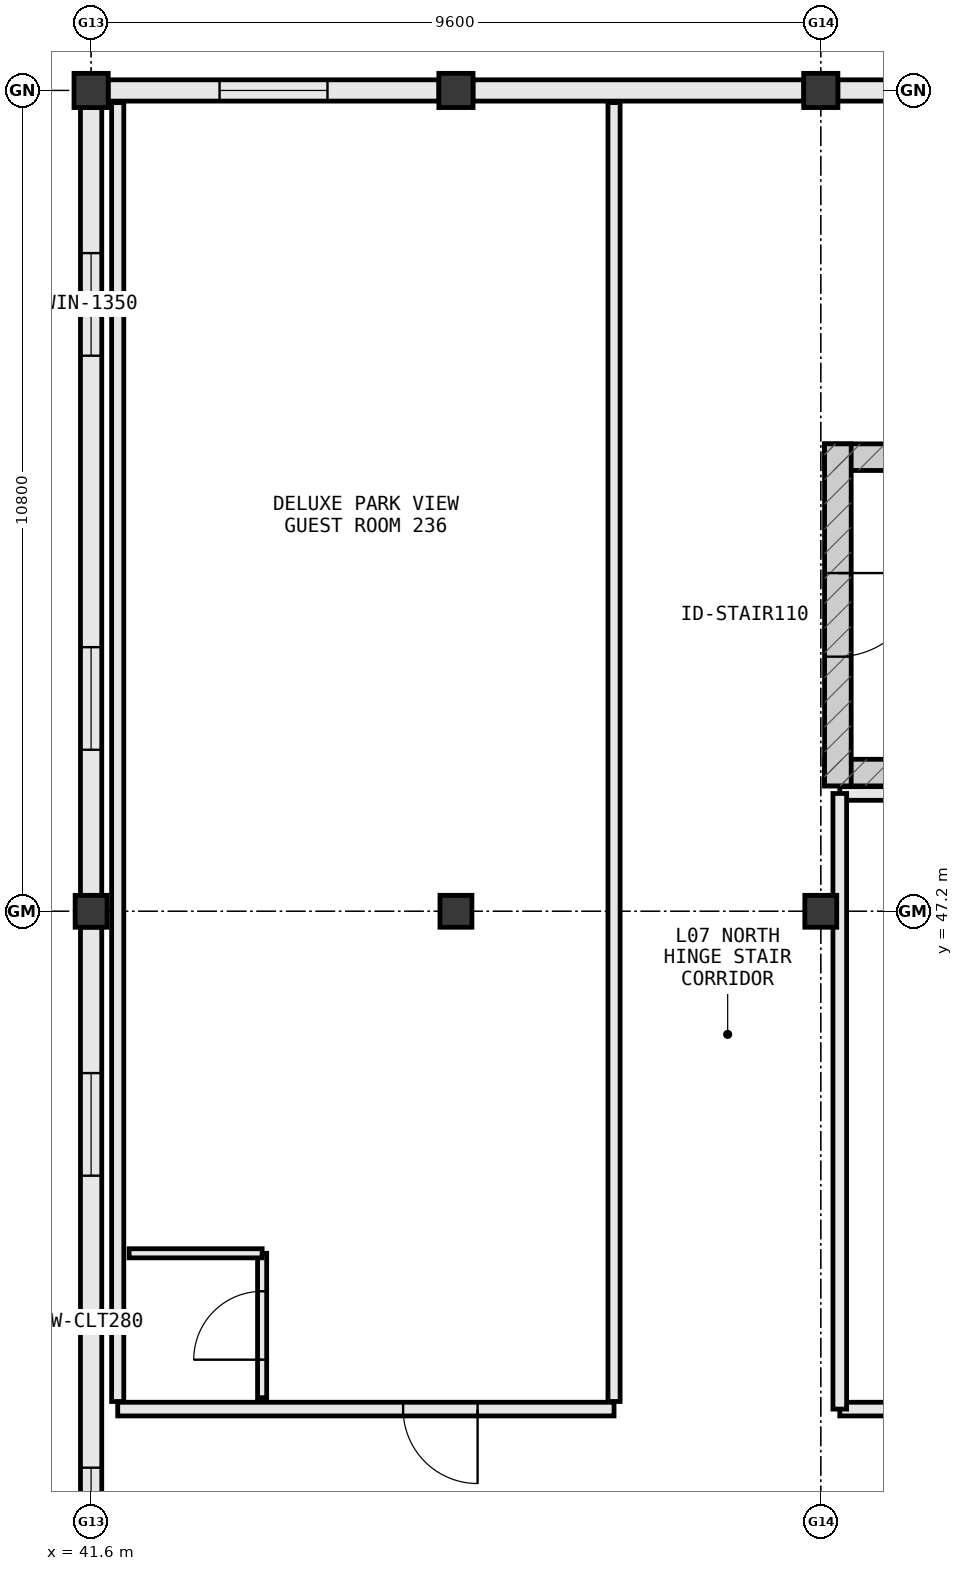
"""IFC4 building model, lengths in metres.
Left out: names, types, materials, properties, quantities, classifications, styles, units other than length and angle.
Written with IfcOpenShell. Run it as: python <this file> out.ifc"""

import sys

from ifc_helpers import new_model, si_unit, direction, frame, frame_2d, origin, origin_2d, place, context, subcontext, project, spatial, rectangle, extrude, element, fill, save


model = new_model("IFC4")
c1 = context("Model", 3, precision=1e-05, world=origin(), true_north=direction((0.0, 1.0)))
c2 = subcontext(c1, "Body", "Model", "MODEL_VIEW")
j1 = project(units=[si_unit("LENGTHUNIT", "METRE"), si_unit("PLANEANGLEUNIT", "RADIAN")], contexts=[c1])
p1 = place(None, origin())
s1 = spatial("IfcSite", under=j1, at=p1, CompositionType="ELEMENT")
p2 = place(p1, origin())
s2 = spatial("IfcBuilding", under=s1, at=p2, CompositionType="ELEMENT")
p3 = place(p2, frame((0.0, 0.0, 31.4)))
s3 = spatial("IfcBuildingStorey", under=s2, at=p3, CompositionType="ELEMENT", Elevation=31.4)
p4 = place(p3, frame((41.6, 58.0, 0.0), z_axis=(0.0, 0.0, 1.0), x_axis=(1.0, 0.0, 0.0)))
e1 = element("IfcColumn", 1, at=p4, inside=s3, PredefinedType="COLUMN", context=c2, shape_type="SweptSolid", body=[
    extrude(rectangle(XDim=0.45, YDim=0.45, at=origin_2d()), origin(), (0.0, 0.0, 1.0), 3.8),
])
for number, where, z_axis, x_axis in (
    (2, (41.6, 47.2, 0.0), (0.0, 0.0, 1.0), (1.0, 0.0, 0.0)),
    (3, (46.4, 47.2, 0.0), (0.0, 0.0, 1.0), (1.0, 0.0, 0.0)),
):
    element("IfcColumn", number, at=place(p3, frame(where, z_axis=z_axis, x_axis=x_axis)), inside=s3, PredefinedType="COLUMN", context=c2, shape_type="SweptSolid", body=[
        extrude(rectangle(XDim=0.42, YDim=0.42, at=origin_2d()), origin(), (0.0, 0.0, 1.0), 3.8),
    ])
p5 = place(p3, frame((46.4, 58.0, 0.0), z_axis=(0.0, 0.0, 1.0), x_axis=(1.0, 0.0, 0.0)))
e4 = element("IfcColumn", 4, at=p5, inside=s3, PredefinedType="COLUMN", context=c2, shape_type="SweptSolid", body=[
    extrude(rectangle(XDim=0.45, YDim=0.45, at=origin_2d()), origin(), (0.0, 0.0, 1.0), 3.8),
])
p6 = place(p3, frame((51.2, 47.2, 0.0), z_axis=(0.0, 0.0, 1.0), x_axis=(1.0, 0.0, 0.0)))
e5 = element("IfcColumn", 5, at=p6, inside=s3, PredefinedType="COLUMN", context=c2, shape_type="SweptSolid", body=[
    extrude(rectangle(XDim=0.42, YDim=0.42, at=origin_2d()), origin(), (0.0, 0.0, 1.0), 3.8),
])
p7 = place(p3, frame((51.2, 58.0, 0.0), z_axis=(0.0, 0.0, 1.0), x_axis=(1.0, 0.0, 0.0)))
e6 = element("IfcColumn", 6, at=p7, inside=s3, PredefinedType="COLUMN", context=c2, shape_type="SweptSolid", body=[
    extrude(rectangle(XDim=0.45, YDim=0.45, at=origin_2d()), origin(), (0.0, 0.0, 1.0), 3.8),
])
p8 = place(p3, frame((60.577, 58.0, 0.0), z_axis=(0.0, 0.0, 1.0), x_axis=(-1.0, 0.0, 0.0)))
e7 = element("IfcWall", 7, at=p8, inside=s3, PredefinedType="STANDARD", context=c2, shape_type="SweptSolid", body=[
    extrude(rectangle(XDim=9.154, YDim=0.28, at=frame_2d((4.577, 0.0))), origin(), (0.0, 0.0, 1.0), 2.87),
])
p9 = place(p8, frame((1.579, 0.0, 0.85)))
e8 = element("IfcOpeningElement", 8, at=p9, cuts=e7, PredefinedType="OPENING", context=c2, shape_type="SweptSolid", body=[
    extrude(rectangle(XDim=1.42, YDim=1.7, at=frame_2d((0.71, 0.85))), frame((0.0, 0.152, 0.0), z_axis=(0.0, -1.0, 0.0), x_axis=(1.0, 0.0, 0.0)), (0.0, 0.0, 1.0), 0.304),
])
p10 = place(p8, frame((6.156, 0.0, 0.85)))
e9 = element("IfcOpeningElement", 9, at=p10, cuts=e7, PredefinedType="OPENING", context=c2, shape_type="SweptSolid", body=[
    extrude(rectangle(XDim=1.42, YDim=1.7, at=frame_2d((0.71, 0.85))), frame((0.0, 0.152, 0.0), z_axis=(0.0, -1.0, 0.0), x_axis=(1.0, 0.0, 0.0)), (0.0, 0.0, 1.0), 0.304),
])
p11 = place(p3, frame((50.977, 58.0, 0.0), z_axis=(0.0, 0.0, 1.0), x_axis=(-1.0, 0.0, 0.0)))
e10 = element("IfcWall", 10, at=p11, inside=s3, PredefinedType="STANDARD", context=c2, shape_type="SweptSolid", body=[
    extrude(rectangle(XDim=4.354, YDim=0.28, at=frame_2d((2.177, 0.0))), origin(), (0.0, 0.0, 1.0), 2.87),
])
p12 = place(p3, frame((46.177, 58.0, 0.0), z_axis=(0.0, 0.0, 1.0), x_axis=(-1.0, 0.0, 0.0)))
e11 = element("IfcWall", 11, at=p12, inside=s3, PredefinedType="STANDARD", context=c2, shape_type="SweptSolid", body=[
    extrude(rectangle(XDim=4.354, YDim=0.28, at=frame_2d((2.177, 0.0))), origin(), (0.0, 0.0, 1.0), 2.87),
])
p13 = place(p12, frame((1.467, 0.0, 0.85)))
e12 = element("IfcOpeningElement", 12, at=p13, cuts=e11, PredefinedType="OPENING", context=c2, shape_type="SweptSolid", body=[
    extrude(rectangle(XDim=1.42, YDim=1.7, at=frame_2d((0.71, 0.85))), frame((0.0, 0.152, 0.0), z_axis=(0.0, -1.0, 0.0), x_axis=(1.0, 0.0, 0.0)), (0.0, 0.0, 1.0), 0.304),
])
p14 = place(p3, frame((41.6, 57.777, 0.0), z_axis=(0.0, 0.0, 1.0), x_axis=(0.0, -1.0, 0.0)))
e13 = element("IfcWall", 13, at=p14, inside=s3, PredefinedType="STANDARD", context=c2, shape_type="SweptSolid", body=[
    extrude(rectangle(XDim=10.369, YDim=0.28, at=frame_2d((5.185, 0.0))), origin(), (0.0, 0.0, 1.0), 2.91),
])
p15 = place(p14, frame((1.917, 0.0, 0.85)))
e14 = element("IfcOpeningElement", 14, at=p15, cuts=e13, PredefinedType="OPENING", context=c2, shape_type="SweptSolid", body=[
    extrude(rectangle(XDim=1.35, YDim=1.65, at=frame_2d((0.675, 0.825))), frame((0.0, 0.152, 0.0), z_axis=(0.0, -1.0, 0.0), x_axis=(1.0, 0.0, 0.0)), (0.0, 0.0, 1.0), 0.304),
])
p16 = place(p14, frame((7.102, 0.0, 0.85)))
e15 = element("IfcOpeningElement", 15, at=p16, cuts=e13, PredefinedType="OPENING", context=c2, shape_type="SweptSolid", body=[
    extrude(rectangle(XDim=1.35, YDim=1.65, at=frame_2d((0.675, 0.825))), frame((0.0, 0.152, 0.0), z_axis=(0.0, -1.0, 0.0), x_axis=(1.0, 0.0, 0.0)), (0.0, 0.0, 1.0), 0.304),
])
p17 = place(p3, frame((41.6, 46.992, 0.0), z_axis=(0.0, 0.0, 1.0), x_axis=(0.0, -1.0, 0.0)))
e16 = element("IfcWall", 16, at=p17, inside=s3, PredefinedType="STANDARD", context=c2, shape_type="SweptSolid", body=[
    extrude(rectangle(XDim=10.384, YDim=0.28, at=frame_2d((5.192, 0.0))), origin(), (0.0, 0.0, 1.0), 2.91),
])
p18 = place(p17, frame((1.921, 0.0, 0.85)))
e17 = element("IfcOpeningElement", 17, at=p18, cuts=e16, PredefinedType="OPENING", context=c2, shape_type="SweptSolid", body=[
    extrude(rectangle(XDim=1.35, YDim=1.65, at=frame_2d((0.675, 0.825))), frame((0.0, 0.152, 0.0), z_axis=(0.0, -1.0, 0.0), x_axis=(1.0, 0.0, 0.0)), (0.0, 0.0, 1.0), 0.304),
])
p19 = place(p17, frame((7.113, 0.0, 0.85)))
e18 = element("IfcOpeningElement", 18, at=p19, cuts=e16, PredefinedType="OPENING", context=c2, shape_type="SweptSolid", body=[
    extrude(rectangle(XDim=1.35, YDim=1.65, at=frame_2d((0.675, 0.825))), frame((0.0, 0.152, 0.0), z_axis=(0.0, -1.0, 0.0), x_axis=(1.0, 0.0, 0.0)), (0.0, 0.0, 1.0), 0.304),
])
for number, where, z_axis, x_axis in (
    (19, (51.25, 49.025, 0.0), (0.0, 0.0, 1.0), (1.0, 0.0, 0.0)),
    (20, (63.35, 53.175, 0.0), (0.0, 0.0, 1.0), (-1.0, 0.0, 0.0)),
):
    element("IfcWall", number, at=place(p3, frame(where, z_axis=z_axis, x_axis=x_axis)), inside=s3, PredefinedType="SHEAR", context=c2, shape_type="SweptSolid", body=[
        extrude(rectangle(XDim=12.1, YDim=0.35, at=frame_2d((6.05, 0.0))), origin(), (0.0, 0.0, 1.0), 3.8),
    ])
p20 = place(p3, frame((51.425, 53.35, 0.0), z_axis=(0.0, 0.0, 1.0), x_axis=(0.0, -1.0, 0.0)))
e21 = element("IfcWall", 21, at=p20, inside=s3, PredefinedType="SHEAR", context=c2, shape_type="SweptSolid", body=[
    extrude(rectangle(XDim=4.5, YDim=0.35, at=frame_2d((2.25, 0.0))), origin(), (0.0, 0.0, 1.0), 3.8),
])
p21 = place(p20, frame((1.7, 0.0, 0.0)))
e22 = element("IfcOpeningElement", 22, at=p21, cuts=e21, PredefinedType="OPENING", context=c2, shape_type="SweptSolid", body=[
    extrude(rectangle(XDim=1.1, YDim=2.2, at=frame_2d((0.55, 1.1))), frame((0.0, 0.187, 0.0), z_axis=(0.0, -1.0, 0.0), x_axis=(1.0, 0.0, 0.0)), (0.0, 0.0, 1.0), 0.374),
])
p22 = place(p3, frame((51.45, 40.65, 0.0), z_axis=(0.0, 0.0, 1.0), x_axis=(1.0, 0.0, 0.0)))
e23 = element("IfcWall", 23, at=p22, inside=s3, PredefinedType="PARTITIONING", context=c2, shape_type="SweptSolid", body=[
    extrude(rectangle(XDim=11.75, YDim=0.18, at=frame_2d((5.875, 0.0))), origin(), (0.0, 0.0, 1.0), 3.555),
])
p23 = place(p22, frame((5.35, 0.0, 0.0)))
e24 = element("IfcOpeningElement", 24, at=p23, cuts=e23, PredefinedType="OPENING", context=c2, shape_type="SweptSolid", body=[
    extrude(rectangle(XDim=1.05, YDim=2.2, at=frame_2d((0.525, 1.1))), frame((0.0, 0.102, 0.0), z_axis=(0.0, -1.0, 0.0), x_axis=(1.0, 0.0, 0.0)), (0.0, 0.0, 1.0), 0.204),
])
p24 = place(p3, frame((63.2, 48.75, 0.0), z_axis=(0.0, 0.0, 1.0), x_axis=(-1.0, 0.0, 0.0)))
e25 = element("IfcWall", 25, at=p24, inside=s3, PredefinedType="PARTITIONING", context=c2, shape_type="SweptSolid", body=[
    extrude(rectangle(XDim=11.75, YDim=0.18, at=frame_2d((5.875, 0.0))), origin(), (0.0, 0.0, 1.0), 3.555),
])
p25 = place(p3, frame((51.45, 48.75, 0.0), z_axis=(0.0, 0.0, 1.0), x_axis=(0.0, -1.0, 0.0)))
e26 = element("IfcWall", 26, at=p25, inside=s3, PredefinedType="PARTITIONING", context=c2, shape_type="SweptSolid", body=[
    extrude(rectangle(XDim=8.1, YDim=0.18, at=frame_2d((4.05, 0.0))), origin(), (0.0, 0.0, 1.0), 2.91),
])
p26 = place(p3, frame((41.95, 40.65, 0.0), z_axis=(0.0, 0.0, 1.0), x_axis=(1.0, 0.0, 0.0)))
e27 = element("IfcWall", 27, at=p26, inside=s3, PredefinedType="PARTITIONING", context=c2, shape_type="SweptSolid", body=[
    extrude(rectangle(XDim=6.53, YDim=0.18, at=frame_2d((3.265, 0.0))), origin(), (0.0, 0.0, 1.0), 3.555),
])
p27 = place(p26, frame((3.755, 0.0, 0.0)))
e28 = element("IfcOpeningElement", 28, at=p27, cuts=e27, PredefinedType="OPENING", context=c2, shape_type="SweptSolid", body=[
    extrude(rectangle(XDim=0.98, YDim=2.18, at=frame_2d((0.49, 1.09))), frame((0.0, 0.102, 0.0), z_axis=(0.0, -1.0, 0.0), x_axis=(1.0, 0.0, 0.0)), (0.0, 0.0, 1.0), 0.204),
])
p28 = place(p3, frame((41.95, 40.75, 0.0), z_axis=(0.0, 0.0, 1.0), x_axis=(0.0, 1.0, 0.0)))
e29 = element("IfcWall", 29, at=p28, inside=s3, PredefinedType="PARTITIONING", context=c2, shape_type="SweptSolid", body=[
    extrude(rectangle(XDim=17.09, YDim=0.16, at=frame_2d((8.545, 0.0))), origin(), (0.0, 0.0, 1.0), 2.91),
])
p29 = place(p3, frame((48.48, 40.75, 0.0), z_axis=(0.0, 0.0, 1.0), x_axis=(0.0, 1.0, 0.0)))
e30 = element("IfcWall", 30, at=p29, inside=s3, PredefinedType="PARTITIONING", context=c2, shape_type="SweptSolid", body=[
    extrude(rectangle(XDim=17.09, YDim=0.16, at=frame_2d((8.545, 0.0))), origin(), (0.0, 0.0, 1.0), 3.1),
])
p30 = place(p3, frame((43.85, 40.8, 0.0), z_axis=(0.0, 0.0, 1.0), x_axis=(0.0, 1.0, 0.0)))
e31 = element("IfcWall", 31, at=p30, inside=s3, PredefinedType="PARTITIONING", context=c2, shape_type="SweptSolid", body=[
    extrude(rectangle(XDim=1.9, YDim=0.12, at=frame_2d((0.95, 0.0))), origin(), (0.0, 0.0, 1.0), 3.1),
])
p31 = place(p30, frame((0.5, 0.0, 0.0)))
e32 = element("IfcOpeningElement", 32, at=p31, cuts=e31, PredefinedType="OPENING", context=c2, shape_type="SweptSolid", body=[
    extrude(rectangle(XDim=0.9, YDim=2.15, at=frame_2d((0.45, 1.075))), frame((0.0, 0.072, 0.0), z_axis=(0.0, -1.0, 0.0), x_axis=(1.0, 0.0, 0.0)), (0.0, 0.0, 1.0), 0.144),
])
p32 = place(p3, frame((42.1, 42.7, 0.0), z_axis=(0.0, 0.0, 1.0), x_axis=(1.0, 0.0, 0.0)))
e33 = element("IfcWall", 33, at=p32, inside=s3, PredefinedType="PARTITIONING", context=c2, shape_type="SweptSolid", body=[
    extrude(rectangle(XDim=1.75, YDim=0.12, at=frame_2d((0.875, 0.0))), origin(), (0.0, 0.0, 1.0), 3.555),
])
p33 = place(p13, origin())
e34 = element("IfcWindow", 34, at=p33, inside=s3, PartitioningType="SINGLE_PANEL", PredefinedType="WINDOW", context=c2, shape_type="SweptSolid", body=[
    extrude(rectangle(XDim=1.42, YDim=1.7, at=frame_2d((0.71, 0.85))), frame((0.0, 0.03, 0.0), z_axis=(0.0, -1.0, 0.0), x_axis=(1.0, 0.0, 0.0)), (0.0, 0.0, 1.0), 0.06),
])
fill(e12, e34)
p34 = place(p15, origin())
e35 = element("IfcWindow", 35, at=p34, inside=s3, PartitioningType="SINGLE_PANEL", PredefinedType="WINDOW", context=c2, shape_type="SweptSolid", body=[
    extrude(rectangle(XDim=1.35, YDim=1.65, at=frame_2d((0.675, 0.825))), frame((0.0, 0.03, 0.0), z_axis=(0.0, -1.0, 0.0), x_axis=(1.0, 0.0, 0.0)), (0.0, 0.0, 1.0), 0.06),
])
fill(e14, e35)
p35 = place(p16, origin())
e36 = element("IfcWindow", 36, at=p35, inside=s3, PartitioningType="SINGLE_PANEL", PredefinedType="WINDOW", context=c2, shape_type="SweptSolid", body=[
    extrude(rectangle(XDim=1.35, YDim=1.65, at=frame_2d((0.675, 0.825))), frame((0.0, 0.03, 0.0), z_axis=(0.0, -1.0, 0.0), x_axis=(1.0, 0.0, 0.0)), (0.0, 0.0, 1.0), 0.06),
])
fill(e15, e36)
p36 = place(p18, origin())
e37 = element("IfcWindow", 37, at=p36, inside=s3, PartitioningType="SINGLE_PANEL", PredefinedType="WINDOW", context=c2, shape_type="SweptSolid", body=[
    extrude(rectangle(XDim=1.35, YDim=1.65, at=frame_2d((0.675, 0.825))), frame((0.0, 0.03, 0.0), z_axis=(0.0, -1.0, 0.0), x_axis=(1.0, 0.0, 0.0)), (0.0, 0.0, 1.0), 0.06),
])
fill(e17, e37)
p37 = place(p19, origin())
e38 = element("IfcWindow", 38, at=p37, inside=s3, PartitioningType="SINGLE_PANEL", PredefinedType="WINDOW", context=c2, shape_type="SweptSolid", body=[
    extrude(rectangle(XDim=1.35, YDim=1.65, at=frame_2d((0.675, 0.825))), frame((0.0, 0.03, 0.0), z_axis=(0.0, -1.0, 0.0), x_axis=(1.0, 0.0, 0.0)), (0.0, 0.0, 1.0), 0.06),
])
fill(e18, e38)
p38 = place(p21, origin())
e39 = element("IfcDoor", 39, at=p38, inside=s3, OperationType="SINGLE_SWING_LEFT", PredefinedType="DOOR", context=c2, shape_type="SweptSolid", body=[
    extrude(rectangle(XDim=1.1, YDim=2.2, at=frame_2d((0.55, 1.1))), frame((0.0, 0.025, 0.0), z_axis=(0.0, -1.0, 0.0), x_axis=(1.0, 0.0, 0.0)), (0.0, 0.0, 1.0), 0.05),
])
fill(e22, e39)
p39 = place(p27, frame((0.98, 0.0, 0.0), z_axis=(0.0, 0.0, 1.0), x_axis=(-1.0, 0.0, 0.0)))
e40 = element("IfcDoor", 40, at=p39, inside=s3, OperationType="SINGLE_SWING_RIGHT", PredefinedType="DOOR", context=c2, shape_type="SweptSolid", body=[
    extrude(rectangle(XDim=0.98, YDim=2.18, at=frame_2d((0.49, 1.09))), frame((0.0, 0.025, 0.0), z_axis=(0.0, -1.0, 0.0), x_axis=(1.0, 0.0, 0.0)), (0.0, 0.0, 1.0), 0.05),
])
fill(e28, e40)
p40 = place(p31, origin())
e41 = element("IfcDoor", 41, at=p40, inside=s3, OperationType="SINGLE_SWING_LEFT", PredefinedType="DOOR", context=c2, shape_type="SweptSolid", body=[
    extrude(rectangle(XDim=0.9, YDim=2.15, at=frame_2d((0.45, 1.075))), frame((0.0, 0.025, 0.0), z_axis=(0.0, -1.0, 0.0), x_axis=(1.0, 0.0, 0.0)), (0.0, 0.0, 1.0), 0.05),
])
fill(e32, e41)
save(model, sys.argv[1])
